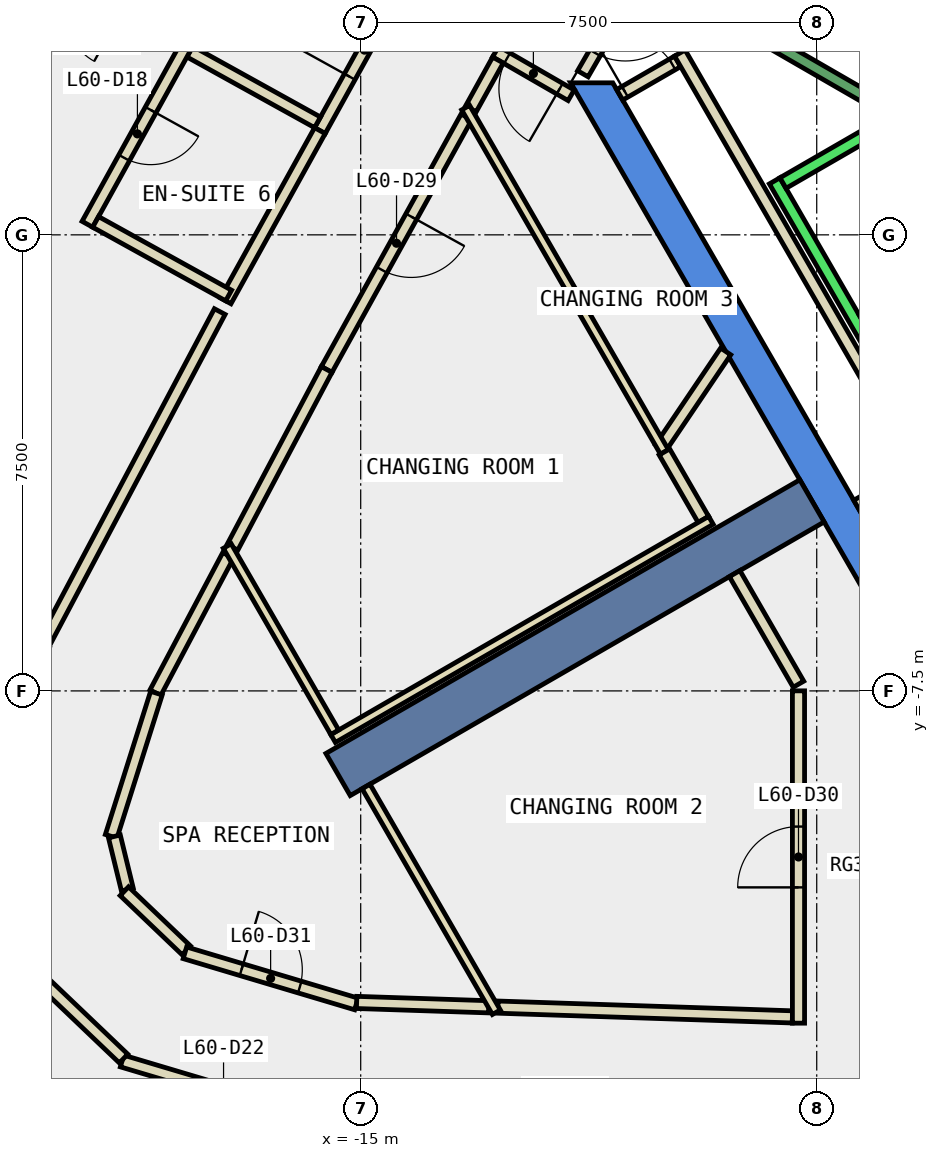
"""IFC4 building model, lengths in metres.
Left out: names, types, materials, properties, quantities, classifications, styles, units other than length and angle.
Written with IfcOpenShell. Run it as: python <this file> out.ifc"""

import sys

from ifc_helpers import new_model, si_unit, direction, frame, frame_2d, origin, place, context, subcontext, project, spatial, polyline, rectangle, outline, extrude, element, fill, save


model = new_model("IFC4")
c1 = context("Model", 3, precision=1e-05, world=origin(), true_north=direction((0.0, 1.0)))
c2 = subcontext(c1, "Body", "Model", "MODEL_VIEW")
j1 = project(units=[si_unit("LENGTHUNIT", "METRE"), si_unit("PLANEANGLEUNIT", "RADIAN")], contexts=[c1])
p1 = place(None, origin())
s1 = spatial("IfcSite", under=j1, at=p1, CompositionType="ELEMENT")
p2 = place(p1, origin())
s2 = spatial("IfcBuilding", under=s1, at=p2, CompositionType="ELEMENT")
p3 = place(p2, frame((0.0, 0.0, 263.0)))
s3 = spatial("IfcBuildingStorey", under=s2, at=p3, CompositionType="ELEMENT", Elevation=263.0)
p4 = place(p3, frame((0.0, 0.0, -0.34)))
e1 = element("IfcWall", 1, at=p4, inside=s3, PredefinedType="SHEAR", context=c2, shape_type="SweptSolid", body=[
    extrude(outline(polyline([(-11.547, 2.5), (-5.774, -7.5), (-5.427, -6.9), (-10.854, 2.5), (-11.547, 2.5)])), origin(), (0.0, 0.0, 1.0), 3.6),
])
p5 = place(p3, frame((-7.578, -4.375, -0.34), z_axis=(0.0, 0.0, 1.0), x_axis=(-0.866024315419, -0.5000018851, 0.0)))
e2 = element("IfcWall", 2, at=p5, inside=s3, PredefinedType="SHEAR", context=c2, shape_type="SweptSolid", body=[
    extrude(rectangle(XDim=9.0, YDim=0.8, at=frame_2d((4.5, 0.0))), origin(), (0.0, 0.0, 1.0), 3.6),
])
p6 = place(p3, frame((-19.591, 6.919, 0.0), z_axis=(0.0, 0.0, 1.0), x_axis=(-0.484260568952, -0.874923826032, 0.0)))
e3 = element("IfcWall", 3, at=p6, inside=s3, PredefinedType="STANDARD", context=c2, shape_type="SweptSolid", body=[
    extrude(rectangle(XDim=5.611, YDim=0.3, at=frame_2d((2.805, 0.0))), origin(), (0.0, 0.0, 1.0), 3.26),
])
p7 = place(p6, frame((0.453, 0.0, 0.9)))
e4 = element("IfcOpeningElement", 4, at=p7, cuts=e3, PredefinedType="OPENING", context=c2, shape_type="SweptSolid", body=[
    extrude(rectangle(XDim=1.9, YDim=2.0, at=frame_2d((0.95, 1.0))), frame((0.0, 0.16, 0.0), z_axis=(0.0, -1.0, 0.0), x_axis=(1.0, 0.0, 0.0)), (0.0, 0.0, 1.0), 0.32),
])
p8 = place(p6, frame((3.258, 0.0, 0.9)))
e5 = element("IfcOpeningElement", 5, at=p8, cuts=e3, PredefinedType="OPENING", context=c2, shape_type="SweptSolid", body=[
    extrude(rectangle(XDim=1.9, YDim=2.0, at=frame_2d((0.95, 1.0))), frame((0.0, 0.16, 0.0), z_axis=(0.0, -1.0, 0.0), x_axis=(1.0, 0.0, 0.0)), (0.0, 0.0, 1.0), 0.32),
])
p9 = place(p3, frame((-11.539, 2.295, 0.0), z_axis=(0.0, 0.0, 1.0), x_axis=(-0.866023989838, 0.500002449018, 0.0)))
e6 = element("IfcWall", 6, at=p9, inside=s3, PredefinedType="PARTITIONING", context=c2, shape_type="SweptSolid", body=[
    extrude(rectangle(XDim=1.434, YDim=0.2, at=frame_2d((0.717, 0.0))), origin(), (0.0, 0.0, 1.0), 3.26),
])
p10 = place(p9, frame((0.217, 0.0, 0.0)))
e7 = element("IfcOpeningElement", 7, at=p10, cuts=e6, PredefinedType="OPENING", context=c2, shape_type="SweptSolid", body=[
    extrude(rectangle(XDim=1.0, YDim=2.1, at=frame_2d((0.5, 1.05))), frame((0.0, 0.11, 0.0), z_axis=(0.0, -1.0, 0.0), x_axis=(1.0, 0.0, 0.0)), (0.0, 0.0, 1.0), 0.22),
])
p11 = place(p3, frame((-12.743, 2.875, 0.0), z_axis=(0.0, 0.0, 1.0), x_axis=(-0.484334040176, -0.8748831565, 0.0)))
e8 = element("IfcWall", 8, at=p11, inside=s3, PredefinedType="PARTITIONING", context=c2, shape_type="SweptSolid", body=[
    extrude(rectangle(XDim=0.919, YDim=0.2, at=frame_2d((0.459, 0.0))), origin(), (0.0, 0.0, 1.0), 3.26),
])
p12 = place(p3, frame((-13.261, 1.939, 0.0), z_axis=(0.0, 0.0, 1.0), x_axis=(-0.484323615817, -0.874888927329, 0.0)))
e9 = element("IfcWall", 9, at=p12, inside=s3, PredefinedType="PARTITIONING", context=c2, shape_type="SweptSolid", body=[
    extrude(rectangle(XDim=4.747, YDim=0.2, at=frame_2d((2.374, 0.0))), origin(), (0.0, 0.0, 1.0), 3.26),
])
p13 = place(p12, frame((1.874, 0.0, 0.0)))
e10 = element("IfcOpeningElement", 10, at=p13, cuts=e9, PredefinedType="OPENING", context=c2, shape_type="SweptSolid", body=[
    extrude(rectangle(XDim=1.0, YDim=2.1, at=frame_2d((0.5, 1.05))), frame((0.0, 0.11, 0.0), z_axis=(0.0, -1.0, 0.0), x_axis=(1.0, 0.0, 0.0)), (0.0, 0.0, 1.0), 0.22),
])
p14 = place(p3, frame((-15.56, -2.214, 0.0), z_axis=(0.0, 0.0, 1.0), x_axis=(-0.468104679961, -0.883673021314, 0.0)))
e11 = element("IfcWall", 11, at=p14, inside=s3, PredefinedType="PARTITIONING", context=c2, shape_type="SweptSolid", body=[
    extrude(rectangle(XDim=3.309, YDim=0.2, at=frame_2d((1.654, 0.0))), origin(), (0.0, 0.0, 1.0), 3.26),
])
p15 = place(p3, frame((-12.744, -12.7, 0.0), z_axis=(0.0, 0.0, 1.0), x_axis=(0.999447196828, -0.033246063702, 0.0)))
e12 = element("IfcWall", 12, at=p15, inside=s3, PredefinedType="PARTITIONING", context=c2, shape_type="SweptSolid", body=[
    extrude(rectangle(XDim=4.847, YDim=0.2, at=frame_2d((2.423, 0.0))), origin(), (0.0, 0.0, 1.0), 3.26),
])
p16 = place(p3, frame((-17.18, -5.271, 0.0), z_axis=(0.0, 0.0, 1.0), x_axis=(-0.468212372113, -0.883615965564, 0.0)))
e13 = element("IfcWall", 13, at=p16, inside=s3, PredefinedType="PARTITIONING", context=c2, shape_type="SweptSolid", body=[
    extrude(rectangle(XDim=2.557, YDim=0.2, at=frame_2d((1.278, 0.0))), origin(), (0.0, 0.0, 1.0), 3.26),
])
p17 = place(p3, frame((-18.36, -7.537, 0.0), z_axis=(0.0, 0.0, 1.0), x_axis=(-0.301325410186, -0.953521366922, 0.0)))
e14 = element("IfcWall", 14, at=p17, inside=s3, PredefinedType="PARTITIONING", context=c2, shape_type="SweptSolid", body=[
    extrude(rectangle(XDim=2.469, YDim=0.2, at=frame_2d((1.234, 0.0))), origin(), (0.0, 0.0, 1.0), 3.26),
])
p18 = place(p3, frame((-19.051, -9.893, 0.0), z_axis=(0.0, 0.0, 1.0), x_axis=(0.237162553963, -0.971469980492, 0.0)))
e15 = element("IfcWall", 15, at=p18, inside=s3, PredefinedType="PARTITIONING", context=c2, shape_type="SweptSolid", body=[
    extrude(rectangle(XDim=0.899, YDim=0.2, at=frame_2d((0.449, 0.0))), origin(), (0.0, 0.0, 1.0), 3.26),
])
p19 = place(p3, frame((-18.887, -10.794, 0.0), z_axis=(0.0, 0.0, 1.0), x_axis=(0.723206051435, -0.690632324155, 0.0)))
e16 = element("IfcWall", 16, at=p19, inside=s3, PredefinedType="PARTITIONING", context=c2, shape_type="SweptSolid", body=[
    extrude(rectangle(XDim=1.409, YDim=0.2, at=frame_2d((0.705, 0.0))), origin(), (0.0, 0.0, 1.0), 3.26),
])
p20 = place(p3, frame((-17.891, -11.807, 0.0), z_axis=(0.0, 0.0, 1.0), x_axis=(0.958288558025, -0.28580244848, 0.0)))
e17 = element("IfcWall", 17, at=p20, inside=s3, PredefinedType="PARTITIONING", context=c2, shape_type="SweptSolid", body=[
    extrude(rectangle(XDim=2.943, YDim=0.2, at=frame_2d((1.471, 0.0))), origin(), (0.0, 0.0, 1.0), 3.26),
])
p21 = place(p20, frame((0.971, 0.0, 0.0)))
e18 = element("IfcOpeningElement", 18, at=p21, cuts=e17, PredefinedType="OPENING", context=c2, shape_type="SweptSolid", body=[
    extrude(rectangle(XDim=1.0, YDim=2.1, at=frame_2d((0.5, 1.05))), frame((0.0, 0.11, 0.0), z_axis=(0.0, -1.0, 0.0), x_axis=(1.0, 0.0, 0.0)), (0.0, 0.0, 1.0), 0.22),
])
p22 = place(p3, frame((-15.067, -12.623, 0.0), z_axis=(0.0, 0.0, 1.0), x_axis=(0.99945112134, -0.033127874247, 0.0)))
e19 = element("IfcWall", 19, at=p22, inside=s3, PredefinedType="PARTITIONING", context=c2, shape_type="SweptSolid", body=[
    extrude(rectangle(XDim=2.174, YDim=0.2, at=frame_2d((1.087, 0.0))), origin(), (0.0, 0.0, 1.0), 3.26),
])
p23 = place(p3, frame((-15.671, 1.714, 0.0), z_axis=(0.0, 0.0, 1.0), x_axis=(0.484203367026, 0.874955484216, 0.0)))
e20 = element("IfcWall", 20, at=p23, inside=s3, PredefinedType="PARTITIONING", context=c2, shape_type="SweptSolid", body=[
    extrude(rectangle(XDim=3.025, YDim=0.2, at=frame_2d((1.513, 0.0))), origin(), (0.0, 0.0, 1.0), 3.26),
])
p24 = place(p23, frame((1.013, 0.0, 0.0)))
e21 = element("IfcOpeningElement", 21, at=p24, cuts=e20, PredefinedType="OPENING", context=c2, shape_type="SweptSolid", body=[
    extrude(rectangle(XDim=1.0, YDim=2.1, at=frame_2d((0.5, 1.05))), frame((0.0, 0.11, 0.0), z_axis=(0.0, -1.0, 0.0), x_axis=(1.0, 0.0, 0.0)), (0.0, 0.0, 1.0), 0.22),
])
p25 = place(p3, frame((-20.229, -6.754, 0.0), z_axis=(0.0, 0.0, 1.0), x_axis=(0.468313568794, 0.883562335822, 0.0)))
e22 = element("IfcWall", 22, at=p25, inside=s3, PredefinedType="PARTITIONING", context=c2, shape_type="SweptSolid", body=[
    extrude(rectangle(XDim=6.216, YDim=0.2, at=frame_2d((3.108, 0.0))), origin(), (0.0, 0.0, 1.0), 3.26),
])
p26 = place(p3, frame((-17.221, -1.085, 0.0), z_axis=(0.0, 0.0, 1.0), x_axis=(0.48445041864, 0.874818719438, 0.0)))
e23 = element("IfcWall", 23, at=p26, inside=s3, PredefinedType="PARTITIONING", context=c2, shape_type="SweptSolid", body=[
    extrude(rectangle(XDim=3.2, YDim=0.2, at=frame_2d((1.6, 0.0))), origin(), (0.0, 0.0, 1.0), 3.26),
])
p27 = place(p3, frame((-15.587, -14.581, 0.0), z_axis=(0.0, 0.0, 1.0), x_axis=(-0.958378336681, 0.285501250052, 0.0)))
e24 = element("IfcWall", 24, at=p27, inside=s3, PredefinedType="PARTITIONING", context=c2, shape_type="SweptSolid", body=[
    extrude(rectangle(XDim=3.482, YDim=0.2, at=frame_2d((1.741, 0.0))), origin(), (0.0, 0.0, 1.0), 3.26),
])
p28 = place(p27, frame((1.291, 0.0, 0.0)))
e25 = element("IfcOpeningElement", 25, at=p28, cuts=e24, PredefinedType="OPENING", context=c2, shape_type="SweptSolid", body=[
    extrude(rectangle(XDim=0.9, YDim=2.1, at=frame_2d((0.45, 1.05))), frame((0.0, 0.11, 0.0), z_axis=(0.0, -1.0, 0.0), x_axis=(1.0, 0.0, 0.0)), (0.0, 0.0, 1.0), 0.22),
])
p29 = place(p3, frame((-18.9, -13.546, 0.0), z_axis=(0.0, 0.0, 1.0), x_axis=(-0.723668833869, 0.690147389248, 0.0)))
e26 = element("IfcWall", 26, at=p29, inside=s3, PredefinedType="PARTITIONING", context=c2, shape_type="SweptSolid", body=[
    extrude(rectangle(XDim=2.476, YDim=0.2, at=frame_2d((1.238, 0.0))), origin(), (0.0, 0.0, 1.0), 3.26),
])
p30 = place(p3, frame((-5.888, -3.902, 0.0), z_axis=(0.0, 0.0, 1.0), x_axis=(-0.86621513555, -0.499671230855, 0.0)))
e27 = element("IfcWall", 27, at=p30, inside=s3, PredefinedType="PARTITIONING", context=c2, shape_type="SweptSolid", body=[
    extrude(rectangle(XDim=1.1, YDim=0.2, at=frame_2d((0.55, 0.0))), origin(), (0.0, 0.0, 1.0), 3.26),
])
p31 = place(p3, frame((-10.741, 2.303, 0.0), z_axis=(0.0, 0.0, 1.0), x_axis=(0.866063652425, 0.499933745558, 0.0)))
e28 = element("IfcWall", 28, at=p31, inside=s3, PredefinedType="PARTITIONING", context=c2, shape_type="SweptSolid", body=[
    extrude(rectangle(XDim=1.1, YDim=0.2, at=frame_2d((0.55, 0.0))), origin(), (0.0, 0.0, 1.0), 3.26),
])
p32 = place(p31, frame((0.1, 0.0, 0.0)))
e29 = element("IfcOpeningElement", 29, at=p32, cuts=e28, PredefinedType="OPENING", context=c2, shape_type="SweptSolid", body=[
    extrude(rectangle(XDim=0.9, YDim=2.1, at=frame_2d((0.45, 1.05))), frame((0.0, 0.11, 0.0), z_axis=(0.0, -1.0, 0.0), x_axis=(1.0, 0.0, 0.0)), (0.0, 0.0, 1.0), 0.22),
])
p33 = place(p3, frame((-9.751, 2.99, 0.0), z_axis=(0.0, 0.0, 1.0), x_axis=(0.500012163284, -0.866018381195, 0.0)))
e30 = element("IfcWall", 30, at=p33, inside=s3, PredefinedType="PARTITIONING", context=c2, shape_type="SweptSolid", body=[
    extrude(rectangle(XDim=8.0, YDim=0.2, at=frame_2d((4.0, 0.0))), origin(), (0.0, 0.0, 1.0), 3.26),
])
p34 = place(p3, frame((-10.069, -3.504, 0.0), z_axis=(0.0, 0.0, 1.0), x_axis=(0.559779346026, 0.828641710127, 0.0)))
e31 = element("IfcWall", 31, at=p34, inside=s3, PredefinedType="PARTITIONING", context=c2, shape_type="SweptSolid", body=[
    extrude(rectangle(XDim=1.915, YDim=0.2, at=frame_2d((0.958, 0.0))), origin(), (0.0, 0.0, 1.0), 3.26),
])
p35 = place(p3, frame((-13.274, 2.092, 0.0), z_axis=(0.0, 0.0, 1.0), x_axis=(0.500002592159, -0.866023907196, 0.0)))
e32 = element("IfcWall", 32, at=p35, inside=s3, PredefinedType="PARTITIONING", context=c2, shape_type="SweptSolid", body=[
    extrude(rectangle(XDim=6.538, YDim=0.15, at=frame_2d((3.269, 0.0))), origin(), (0.0, 0.0, 1.0), 3.26),
])
p36 = place(p3, frame((-9.364, -4.68, 0.0), z_axis=(0.0, 0.0, 1.0), x_axis=(-0.500052244015, 0.865995238587, 0.0)))
e33 = element("IfcWall", 33, at=p36, inside=s3, PredefinedType="PARTITIONING", context=c2, shape_type="SweptSolid", body=[
    extrude(rectangle(XDim=1.281, YDim=0.2, at=frame_2d((0.641, 0.0))), origin(), (0.0, 0.0, 1.0), 3.26),
])
p37 = place(p3, frame((-7.8, -12.964, 0.0), z_axis=(0.0, 0.0, 1.0), x_axis=(0.0, 1.0, 0.0)))
e34 = element("IfcWall", 34, at=p37, inside=s3, PredefinedType="PARTITIONING", context=c2, shape_type="SweptSolid", body=[
    extrude(rectangle(XDim=5.465, YDim=0.2, at=frame_2d((2.732, 0.0))), origin(), (0.0, 0.0, 1.0), 3.26),
])
p38 = place(p37, frame((2.233, 0.0, 0.0)))
e35 = element("IfcOpeningElement", 35, at=p38, cuts=e34, PredefinedType="OPENING", context=c2, shape_type="SweptSolid", body=[
    extrude(rectangle(XDim=1.0, YDim=2.1, at=frame_2d((0.5, 1.05))), frame((0.0, 0.11, 0.0), z_axis=(0.0, -1.0, 0.0), x_axis=(1.0, 0.0, 0.0)), (0.0, 0.0, 1.0), 0.22),
])
p39 = place(p3, frame((-7.8, -7.39, 0.0), z_axis=(0.0, 0.0, 1.0), x_axis=(-0.499977374825, 0.866038466041, 0.0)))
e36 = element("IfcWall", 36, at=p39, inside=s3, PredefinedType="PARTITIONING", context=c2, shape_type="SweptSolid", body=[
    extrude(rectangle(XDim=2.1, YDim=0.2, at=frame_2d((1.05, 0.0))), origin(), (0.0, 0.0, 1.0), 3.26),
])
p40 = place(p3, frame((-9.24, -4.695, 0.0), z_axis=(0.0, 0.0, 1.0), x_axis=(-0.866015037582, -0.500017954359, 0.0)))
e37 = element("IfcWall", 37, at=p40, inside=s3, PredefinedType="PARTITIONING", context=c2, shape_type="SweptSolid", body=[
    extrude(rectangle(XDim=7.176, YDim=0.15, at=frame_2d((3.588, 0.0))), origin(), (0.0, 0.0, 1.0), 3.26),
])
p41 = place(p3, frame((-15.427, -8.18, 0.0), z_axis=(0.0, 0.0, 1.0), x_axis=(-0.500045204515, 0.865999303373, 0.0)))
e38 = element("IfcWall", 38, at=p41, inside=s3, PredefinedType="PARTITIONING", context=c2, shape_type="SweptSolid", body=[
    extrude(rectangle(XDim=3.536, YDim=0.15, at=frame_2d((1.768, 0.0))), origin(), (0.0, 0.0, 1.0), 3.26),
])
p42 = place(p3, frame((-12.769, -12.784, 0.0), z_axis=(0.0, 0.0, 1.0), x_axis=(-0.499998569178, 0.866026229868, 0.0)))
e39 = element("IfcWall", 39, at=p42, inside=s3, PredefinedType="PARTITIONING", context=c2, shape_type="SweptSolid", body=[
    extrude(rectangle(XDim=4.286, YDim=0.15, at=frame_2d((2.143, 0.0))), origin(), (0.0, 0.0, 1.0), 3.26),
])
p43 = place(p3, frame((-15.71, 1.85, 0.0), z_axis=(0.0, 0.0, 1.0), x_axis=(-0.874842414173, 0.484407628308, 0.0)))
e40 = element("IfcWall", 40, at=p43, inside=s3, PredefinedType="PARTITIONING", context=c2, shape_type="SweptSolid", body=[
    extrude(rectangle(XDim=2.401, YDim=0.2, at=frame_2d((1.2, 0.0))), origin(), (0.0, 0.0, 1.0), 3.26),
])
p44 = place(p3, frame((-17.849, 3.148, 0.0), z_axis=(0.0, 0.0, 1.0), x_axis=(-0.484257957482, -0.874925271446, 0.0)))
e41 = element("IfcWall", 41, at=p44, inside=s3, PredefinedType="PARTITIONING", context=c2, shape_type="SweptSolid", body=[
    extrude(rectangle(XDim=3.399, YDim=0.2, at=frame_2d((1.699, 0.0))), origin(), (0.0, 0.0, 1.0), 3.26),
])
p45 = place(p44, frame((1.25, 0.0, 0.0)))
e42 = element("IfcOpeningElement", 42, at=p45, cuts=e41, PredefinedType="OPENING", context=c2, shape_type="SweptSolid", body=[
    extrude(rectangle(XDim=0.9, YDim=2.1, at=frame_2d((0.45, 1.05))), frame((0.0, 0.11, 0.0), z_axis=(0.0, -1.0, 0.0), x_axis=(1.0, 0.0, 0.0)), (0.0, 0.0, 1.0), 0.22),
])
p46 = place(p3, frame((-19.36, 0.213, 0.0), z_axis=(0.0, 0.0, 1.0), x_axis=(0.874939003568, -0.484233146362, 0.0)))
e43 = element("IfcWall", 43, at=p46, inside=s3, PredefinedType="PARTITIONING", context=c2, shape_type="SweptSolid", body=[
    extrude(rectangle(XDim=2.501, YDim=0.2, at=frame_2d((1.25, 0.0))), origin(), (0.0, 0.0, 1.0), 3.26),
])
p47 = place(p3, frame((-10.449, 4.203, 0.0), z_axis=(0.0, 0.0, 1.0), x_axis=(-0.499914839587, -0.866074565589, 0.0)))
e44 = element("IfcWall", 44, at=p47, inside=s3, PredefinedType="PARTITIONING", context=c2, shape_type="SweptSolid", body=[
    extrude(rectangle(XDim=1.794, YDim=0.2, at=frame_2d((0.897, 0.0))), origin(), (0.0, 0.0, 1.0), 2.4),
])
p48 = place(p47, frame((0.397, 0.0, 0.0)))
e45 = element("IfcOpeningElement", 45, at=p48, cuts=e44, PredefinedType="OPENING", context=c2, shape_type="SweptSolid", body=[
    extrude(rectangle(XDim=1.0, YDim=2.1, at=frame_2d((0.5, 1.05))), frame((0.0, 0.11, 0.0), z_axis=(0.0, -1.0, 0.0), x_axis=(1.0, 0.0, 0.0)), (0.0, 0.0, 1.0), 0.22),
])
p49 = place(p3, frame((-8.192, 0.888, 0.0), z_axis=(0.0, 0.0, 1.0), x_axis=(0.500034260056, -0.866005622828, 0.0)))
e46 = element("IfcWall", 46, at=p49, inside=s3, PredefinedType="STANDARD", context=c2, shape_type="SweptSolid", body=[
    extrude(rectangle(XDim=5.399, YDim=0.2, at=frame_2d((2.7, 0.0))), origin(), (0.0, 0.0, 1.0), 3.26),
])
for number, where, z_axis, x_axis in (
    (47, (-5.977, 2.052, 0.0), (0.0, 0.0, 1.0), (-0.866, -0.5, 0.0)),
    (48, (-4.677, -0.2, 0.0), (0.0, 0.0, 1.0), (-0.866, -0.5, 0.0)),
):
    element("IfcWall", number, at=place(p3, frame(where, z_axis=z_axis, x_axis=x_axis)), inside=s3, PredefinedType="STANDARD", context=c2, shape_type="SweptSolid", body=[
        extrude(rectangle(XDim=2.399, YDim=0.2, at=frame_2d((1.2, 0.0))), origin(), (0.0, 0.0, 1.0), 3.26),
    ])
p50 = place(p3, frame((-6.25, 2.01, 0.0), z_axis=(0.0, 0.0, 1.0), x_axis=(-0.86611865017, 0.499838457731, 0.0)))
e49 = element("IfcWall", 49, at=p50, inside=s3, PredefinedType="STANDARD", context=c2, shape_type="SweptSolid", body=[
    extrude(rectangle(XDim=2.733, YDim=0.2, at=frame_2d((1.366, 0.0))), origin(), (0.0, 0.0, 1.0), 3.26),
])
p51 = place(p24, origin())
e50 = element("IfcDoor", 50, at=p51, inside=s3, OperationType="SINGLE_SWING_RIGHT", PredefinedType="DOOR", context=c2, shape_type="SweptSolid", body=[
    extrude(rectangle(XDim=1.0, YDim=2.1, at=frame_2d((0.5, 1.05))), frame((0.0, 0.025, 0.0), z_axis=(0.0, -1.0, 0.0), x_axis=(1.0, 0.0, 0.0)), (0.0, 0.0, 1.0), 0.05),
])
fill(e21, e50)
p52 = place(p45, origin())
e51 = element("IfcDoor", 51, at=p52, inside=s3, OperationType="SINGLE_SWING_LEFT", PredefinedType="DOOR", context=c2, shape_type="SweptSolid", body=[
    extrude(rectangle(XDim=0.9, YDim=2.1, at=frame_2d((0.45, 1.05))), frame((0.0, 0.025, 0.0), z_axis=(0.0, -1.0, 0.0), x_axis=(1.0, 0.0, 0.0)), (0.0, 0.0, 1.0), 0.05),
])
fill(e42, e51)
p53 = place(p13, origin())
e52 = element("IfcDoor", 52, at=p53, inside=s3, OperationType="SINGLE_SWING_LEFT", PredefinedType="DOOR", context=c2, shape_type="SweptSolid", body=[
    extrude(rectangle(XDim=1.0, YDim=2.1, at=frame_2d((0.5, 1.05))), frame((0.0, 0.025, 0.0), z_axis=(0.0, -1.0, 0.0), x_axis=(1.0, 0.0, 0.0)), (0.0, 0.0, 1.0), 0.05),
])
fill(e10, e52)
p54 = place(p38, origin())
e53 = element("IfcDoor", 53, at=p54, inside=s3, OperationType="SINGLE_SWING_LEFT", PredefinedType="DOOR", context=c2, shape_type="SweptSolid", body=[
    extrude(rectangle(XDim=1.0, YDim=2.1, at=frame_2d((0.5, 1.05))), frame((0.0, 0.025, 0.0), z_axis=(0.0, -1.0, 0.0), x_axis=(1.0, 0.0, 0.0)), (0.0, 0.0, 1.0), 0.05),
])
fill(e35, e53)
p55 = place(p21, origin())
e54 = element("IfcDoor", 54, at=p55, inside=s3, OperationType="SINGLE_SWING_LEFT", PredefinedType="DOOR", context=c2, shape_type="SweptSolid", body=[
    extrude(rectangle(XDim=1.0, YDim=2.1, at=frame_2d((0.5, 1.05))), frame((0.0, 0.025, 0.0), z_axis=(0.0, -1.0, 0.0), x_axis=(1.0, 0.0, 0.0)), (0.0, 0.0, 1.0), 0.05),
])
fill(e18, e54)
p56 = place(p10, origin())
e55 = element("IfcDoor", 55, at=p56, inside=s3, OperationType="SINGLE_SWING_RIGHT", PredefinedType="DOOR", context=c2, shape_type="SweptSolid", body=[
    extrude(rectangle(XDim=1.0, YDim=2.1, at=frame_2d((0.5, 1.05))), frame((0.0, 0.025, 0.0), z_axis=(0.0, -1.0, 0.0), x_axis=(1.0, 0.0, 0.0)), (0.0, 0.0, 1.0), 0.05),
])
fill(e7, e55)
p57 = place(p32, origin())
e56 = element("IfcDoor", 56, at=p57, inside=s3, OperationType="SINGLE_SWING_RIGHT", PredefinedType="DOOR", context=c2, shape_type="SweptSolid", body=[
    extrude(rectangle(XDim=0.9, YDim=2.1, at=frame_2d((0.45, 1.05))), frame((0.0, 0.025, 0.0), z_axis=(0.0, -1.0, 0.0), x_axis=(1.0, 0.0, 0.0)), (0.0, 0.0, 1.0), 0.05),
])
fill(e29, e56)
p58 = place(p48, origin())
e57 = element("IfcDoor", 57, at=p58, inside=s3, OperationType="SINGLE_SWING_LEFT", PredefinedType="DOOR", context=c2, shape_type="SweptSolid", body=[
    extrude(rectangle(XDim=1.0, YDim=2.1, at=frame_2d((0.5, 1.05))), frame((0.0, 0.025, 0.0), z_axis=(0.0, -1.0, 0.0), x_axis=(1.0, 0.0, 0.0)), (0.0, 0.0, 1.0), 0.05),
])
fill(e45, e57)
save(model, sys.argv[1])
